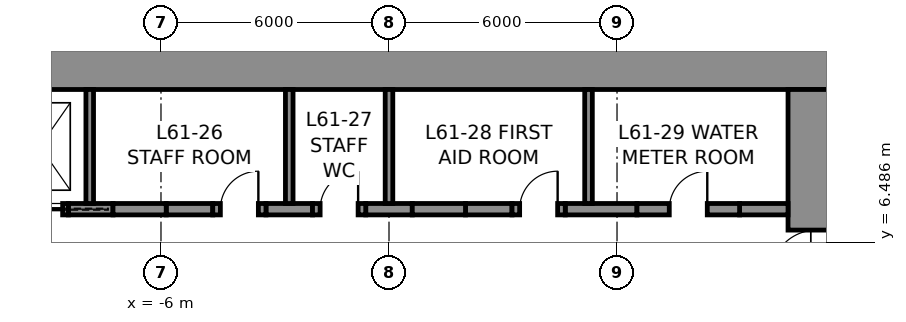
"""IFC4 building model, lengths in metres.
Left out: names, types, materials, properties, quantities, classifications, styles, units other than length and angle.
Written with IfcOpenShell. Run it as: python <this file> out.ifc"""

import sys

from ifc_helpers import new_model, si_unit, direction, frame, frame_2d, origin, place, context, subcontext, project, spatial, rectangle, extrude, element, fill, save


model = new_model("IFC4")
c1 = context("Model", 3, precision=1e-05, world=origin(), true_north=direction((0.0, 1.0)))
c2 = subcontext(c1, "Body", "Model", "MODEL_VIEW")
j1 = project(units=[si_unit("LENGTHUNIT", "METRE"), si_unit("PLANEANGLEUNIT", "RADIAN")], contexts=[c1])
p1 = place(None, origin())
s1 = spatial("IfcSite", under=j1, at=p1, CompositionType="ELEMENT")
p2 = place(p1, origin())
s2 = spatial("IfcBuilding", under=s1, at=p2, CompositionType="ELEMENT")
p3 = place(p2, frame((0.0, 0.0, 273.8)))
s3 = spatial("IfcBuildingStorey", under=s2, at=p3, CompositionType="ELEMENT", Elevation=273.8)
p4 = place(p3, frame((-12.0, 11.25, 0.0), z_axis=(0.0, 0.0, 1.0), x_axis=(1.0, 0.0, 0.0)))
e1 = element("IfcWall", 1, at=p4, inside=s3, PredefinedType="SHEAR", context=c2, shape_type="SweptSolid", body=[
    extrude(rectangle(XDim=24.0, YDim=1.5, at=frame_2d((12.0, 0.0))), origin(), (0.0, 0.0, 1.0), 4.0),
])
p5 = place(p3, frame((11.25, 10.5, 0.0), z_axis=(0.0, 0.0, 1.0), x_axis=(0.0, -1.0, 0.0)))
e2 = element("IfcWall", 2, at=p5, inside=s3, PredefinedType="SHEAR", context=c2, shape_type="SweptSolid", body=[
    extrude(rectangle(XDim=21.0, YDim=1.5, at=frame_2d((10.5, 0.0))), origin(), (0.0, 0.0, 1.0), 4.0),
])
p6 = place(p5, frame((3.7, 0.0, 0.0)))
e3 = element("IfcOpeningElement", 3, at=p6, cuts=e2, PredefinedType="OPENING", context=c2, shape_type="SweptSolid", body=[
    extrude(rectangle(XDim=1.2, YDim=2.3, at=frame_2d((0.6, 1.15))), frame((0.0, 0.76, 0.0), z_axis=(0.0, -1.0, 0.0), x_axis=(1.0, 0.0, 0.0)), (0.0, 0.0, 1.0), 1.52),
])
p7 = place(p5, frame((16.1, 0.0, 0.0)))
e4 = element("IfcOpeningElement", 4, at=p7, cuts=e2, PredefinedType="OPENING", context=c2, shape_type="SweptSolid", body=[
    extrude(rectangle(XDim=1.2, YDim=2.3, at=frame_2d((0.6, 1.15))), frame((0.0, 0.76, 0.0), z_axis=(0.0, -1.0, 0.0), x_axis=(1.0, 0.0, 0.0)), (0.0, 0.0, 1.0), 1.52),
])
p8 = place(p3, frame((-8.438, 7.35, 0.0), z_axis=(0.0, 0.0, 1.0), x_axis=(1.0, 0.0, 0.0)))
e5 = element("IfcWall", 5, at=p8, inside=s3, PredefinedType="SHEAR", context=c2, shape_type="SweptSolid", body=[
    extrude(rectangle(XDim=1.175, YDim=0.3, at=frame_2d((0.587, 0.0))), origin(), (0.0, 0.0, 1.0), 4.0),
])
for number, where, z_axis, x_axis in (
    (6, (-5.863, 7.35, 0.0), (0.0, 0.0, 1.0), (1.0, 0.0, 0.0)),
    (7, (-3.238, 7.35, 0.0), (0.0, 0.0, 1.0), (1.0, 0.0, 0.0)),
    (8, (-0.613, 7.35, 0.0), (0.0, 0.0, 1.0), (1.0, 0.0, 0.0)),
    (9, (2.012, 7.35, 0.0), (0.0, 0.0, 1.0), (1.0, 0.0, 0.0)),
):
    element("IfcWall", number, at=place(p3, frame(where, z_axis=z_axis, x_axis=x_axis)), inside=s3, PredefinedType="SHEAR", context=c2, shape_type="SweptSolid", body=[
        extrude(rectangle(XDim=1.225, YDim=0.3, at=frame_2d((0.613, 0.0))), origin(), (0.0, 0.0, 1.0), 4.0),
    ])
p9 = place(p3, frame((4.637, 7.35, 0.0), z_axis=(0.0, 0.0, 1.0), x_axis=(1.0, 0.0, 0.0)))
e10 = element("IfcWall", 10, at=p9, inside=s3, PredefinedType="SHEAR", context=c2, shape_type="SweptSolid", body=[
    extrude(rectangle(XDim=1.887, YDim=0.3, at=frame_2d((0.944, 0.0))), origin(), (0.0, 0.0, 1.0), 4.0),
])
p10 = place(p3, frame((9.225, 7.35, 0.0), z_axis=(0.0, 0.0, 1.0), x_axis=(1.0, 0.0, 0.0)))
e11 = element("IfcWall", 11, at=p10, inside=s3, PredefinedType="SHEAR", context=c2, shape_type="SweptSolid", body=[
    extrude(rectangle(XDim=1.275, YDim=0.3, at=frame_2d((0.637, 0.0))), origin(), (0.0, 0.0, 1.0), 4.0),
])
p11 = place(p3, frame((-9.938, 7.35, 0.0), z_axis=(0.0, 0.0, 1.0), x_axis=(1.0, 0.0, 0.0)))
e12 = element("IfcWall", 12, at=p11, inside=s3, PredefinedType="PARTITIONING", context=c2, shape_type="SweptSolid", body=[
    extrude(rectangle(XDim=1.5, YDim=0.3, at=frame_2d((0.75, 0.0))), origin(), (0.0, 0.0, 1.0), 4.0),
])
p12 = place(p11, frame((0.15, 0.0, 0.0)))
e13 = element("IfcOpeningElement", 13, at=p12, cuts=e12, PredefinedType="OPENING", context=c2, shape_type="SweptSolid", body=[
    extrude(rectangle(XDim=1.2, YDim=2.3, at=frame_2d((0.6, 1.15))), frame((0.0, 0.16, 0.0), z_axis=(0.0, -1.0, 0.0), x_axis=(1.0, 0.0, 0.0)), (0.0, 0.0, 1.0), 0.32),
])
p13 = place(p3, frame((-7.262, 7.35, 0.0), z_axis=(0.0, 0.0, 1.0), x_axis=(1.0, 0.0, 0.0)))
e14 = element("IfcWall", 14, at=p13, inside=s3, PredefinedType="PARTITIONING", context=c2, shape_type="SweptSolid", body=[
    extrude(rectangle(XDim=1.4, YDim=0.3, at=frame_2d((0.7, 0.0))), origin(), (0.0, 0.0, 1.0), 4.0),
])
p14 = place(p3, frame((-4.637, 7.35, 0.0), z_axis=(0.0, 0.0, 1.0), x_axis=(1.0, 0.0, 0.0)))
e15 = element("IfcWall", 15, at=p14, inside=s3, PredefinedType="PARTITIONING", context=c2, shape_type="SweptSolid", body=[
    extrude(rectangle(XDim=1.4, YDim=0.3, at=frame_2d((0.7, 0.0))), origin(), (0.0, 0.0, 1.0), 4.0),
])
p15 = place(p14, frame((0.2, 0.0, 0.0)))
e16 = element("IfcOpeningElement", 16, at=p15, cuts=e15, PredefinedType="OPENING", context=c2, shape_type="SweptSolid", body=[
    extrude(rectangle(XDim=1.0, YDim=2.3, at=frame_2d((0.5, 1.15))), frame((0.0, 0.16, 0.0), z_axis=(0.0, -1.0, 0.0), x_axis=(1.0, 0.0, 0.0)), (0.0, 0.0, 1.0), 0.32),
])
p16 = place(p3, frame((-2.012, 7.35, 0.0), z_axis=(0.0, 0.0, 1.0), x_axis=(1.0, 0.0, 0.0)))
e17 = element("IfcWall", 17, at=p16, inside=s3, PredefinedType="PARTITIONING", context=c2, shape_type="SweptSolid", body=[
    extrude(rectangle(XDim=1.4, YDim=0.3, at=frame_2d((0.7, 0.0))), origin(), (0.0, 0.0, 1.0), 4.0),
])
p17 = place(p16, frame((0.2, 0.0, 0.0)))
e18 = element("IfcOpeningElement", 18, at=p17, cuts=e17, PredefinedType="OPENING", context=c2, shape_type="SweptSolid", body=[
    extrude(rectangle(XDim=1.0, YDim=2.3, at=frame_2d((0.5, 1.15))), frame((0.0, 0.16, 0.0), z_axis=(0.0, -1.0, 0.0), x_axis=(1.0, 0.0, 0.0)), (0.0, 0.0, 1.0), 0.32),
])
p18 = place(p3, frame((0.613, 7.35, 0.0), z_axis=(0.0, 0.0, 1.0), x_axis=(1.0, 0.0, 0.0)))
e19 = element("IfcWall", 19, at=p18, inside=s3, PredefinedType="PARTITIONING", context=c2, shape_type="SweptSolid", body=[
    extrude(rectangle(XDim=1.4, YDim=0.3, at=frame_2d((0.7, 0.0))), origin(), (0.0, 0.0, 1.0), 4.0),
])
p19 = place(p3, frame((3.238, 7.35, 0.0), z_axis=(0.0, 0.0, 1.0), x_axis=(1.0, 0.0, 0.0)))
e20 = element("IfcWall", 20, at=p19, inside=s3, PredefinedType="PARTITIONING", context=c2, shape_type="SweptSolid", body=[
    extrude(rectangle(XDim=1.4, YDim=0.3, at=frame_2d((0.7, 0.0))), origin(), (0.0, 0.0, 1.0), 4.0),
])
p20 = place(p19, frame((0.2, 0.0, 0.0)))
e21 = element("IfcOpeningElement", 21, at=p20, cuts=e20, PredefinedType="OPENING", context=c2, shape_type="SweptSolid", body=[
    extrude(rectangle(XDim=1.0, YDim=2.3, at=frame_2d((0.5, 1.15))), frame((0.0, 0.16, 0.0), z_axis=(0.0, -1.0, 0.0), x_axis=(1.0, 0.0, 0.0)), (0.0, 0.0, 1.0), 0.32),
])
p21 = place(p3, frame((6.525, 7.35, 0.0), z_axis=(0.0, 0.0, 1.0), x_axis=(1.0, 0.0, 0.0)))
e22 = element("IfcWall", 22, at=p21, inside=s3, PredefinedType="PARTITIONING", context=c2, shape_type="SweptSolid", body=[
    extrude(rectangle(XDim=2.7, YDim=0.3, at=frame_2d((1.35, 0.0))), origin(), (0.0, 0.0, 1.0), 4.0),
])
p22 = place(p21, frame((0.85, 0.0, 0.0)))
e23 = element("IfcOpeningElement", 23, at=p22, cuts=e22, PredefinedType="OPENING", context=c2, shape_type="SweptSolid", body=[
    extrude(rectangle(XDim=1.0, YDim=2.3, at=frame_2d((0.5, 1.15))), frame((0.0, 0.16, 0.0), z_axis=(0.0, -1.0, 0.0), x_axis=(1.0, 0.0, 0.0)), (0.0, 0.0, 1.0), 0.32),
])
for number, where, z_axis, x_axis in (
    (24, (-7.875, 7.5, 0.0), (0.0, 0.0, 1.0), (0.0, 1.0, 0.0)),
    (25, (-2.625, 7.5, 0.0), (0.0, 0.0, 1.0), (0.0, 1.0, 0.0)),
    (26, (0.0, 7.5, 0.0), (0.0, 0.0, 1.0), (0.0, 1.0, 0.0)),
    (27, (5.25, 7.5, 0.0), (0.0, 0.0, 1.0), (0.0, 1.0, 0.0)),
):
    element("IfcWall", number, at=place(p3, frame(where, z_axis=z_axis, x_axis=x_axis)), inside=s3, PredefinedType="PARTITIONING", context=c2, shape_type="SweptSolid", body=[
        extrude(rectangle(XDim=3.0, YDim=0.2, at=frame_2d((1.5, 0.0))), origin(), (0.0, 0.0, 1.0), 4.0),
    ])
p23 = place(p15, origin())
e28 = element("IfcDoor", 28, at=p23, inside=s3, OperationType="SINGLE_SWING_RIGHT", PredefinedType="DOOR", context=c2, shape_type="SweptSolid", body=[
    extrude(rectangle(XDim=1.0, YDim=2.3, at=frame_2d((0.5, 1.15))), frame((0.0, 0.025, 0.0), z_axis=(0.0, -1.0, 0.0), x_axis=(1.0, 0.0, 0.0)), (0.0, 0.0, 1.0), 0.05),
])
fill(e16, e28)
p24 = place(p17, origin())
e29 = element("IfcDoor", 29, at=p24, inside=s3, OperationType="SINGLE_SWING_RIGHT", PredefinedType="DOOR", context=c2, shape_type="SweptSolid", body=[
    extrude(rectangle(XDim=1.0, YDim=2.3, at=frame_2d((0.5, 1.15))), frame((0.0, 0.025, 0.0), z_axis=(0.0, -1.0, 0.0), x_axis=(1.0, 0.0, 0.0)), (0.0, 0.0, 1.0), 0.05),
])
fill(e18, e29)
p25 = place(p20, origin())
e30 = element("IfcDoor", 30, at=p25, inside=s3, OperationType="SINGLE_SWING_RIGHT", PredefinedType="DOOR", context=c2, shape_type="SweptSolid", body=[
    extrude(rectangle(XDim=1.0, YDim=2.3, at=frame_2d((0.5, 1.15))), frame((0.0, 0.025, 0.0), z_axis=(0.0, -1.0, 0.0), x_axis=(1.0, 0.0, 0.0)), (0.0, 0.0, 1.0), 0.05),
])
fill(e21, e30)
p26 = place(p22, origin())
e31 = element("IfcDoor", 31, at=p26, inside=s3, OperationType="SINGLE_SWING_RIGHT", PredefinedType="DOOR", context=c2, shape_type="SweptSolid", body=[
    extrude(rectangle(XDim=1.0, YDim=2.3, at=frame_2d((0.5, 1.15))), frame((0.0, 0.025, 0.0), z_axis=(0.0, -1.0, 0.0), x_axis=(1.0, 0.0, 0.0)), (0.0, 0.0, 1.0), 0.05),
])
fill(e23, e31)
p27 = place(p6, frame((1.2, 0.0, 0.0), z_axis=(0.0, 0.0, 1.0), x_axis=(-1.0, 0.0, 0.0)))
e32 = element("IfcDoor", 32, at=p27, inside=s3, OperationType="SINGLE_SWING_LEFT", PredefinedType="DOOR", context=c2, shape_type="SweptSolid", body=[
    extrude(rectangle(XDim=1.2, YDim=2.3, at=frame_2d((0.6, 1.15))), frame((0.0, 0.025, 0.0), z_axis=(0.0, -1.0, 0.0), x_axis=(1.0, 0.0, 0.0)), (0.0, 0.0, 1.0), 0.05),
])
fill(e3, e32)
p28 = place(p12, frame((1.2, 0.0, 0.0), z_axis=(0.0, 0.0, 1.0), x_axis=(-1.0, 0.0, 0.0)))
e33 = element("IfcDoor", 33, at=p28, inside=s3, OperationType="SLIDING_TO_LEFT", PredefinedType="DOOR", context=c2, shape_type="SweptSolid", body=[
    extrude(rectangle(XDim=1.2, YDim=2.3, at=frame_2d((0.6, 1.15))), frame((0.0, 0.025, 0.0), z_axis=(0.0, -1.0, 0.0), x_axis=(1.0, 0.0, 0.0)), (0.0, 0.0, 1.0), 0.05),
])
fill(e13, e33)
save(model, sys.argv[1])
